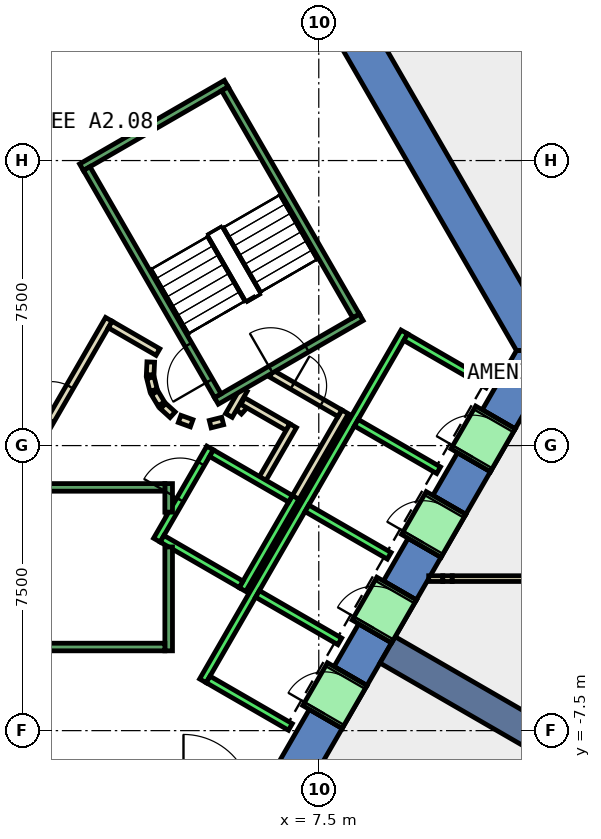
"""IFC4 building model, lengths in metres.
Left out: names, types, materials, properties, quantities, classifications, styles, units other than length and angle.
Written with IfcOpenShell. Run it as: python <this file> out.ifc"""

import sys

from ifc_helpers import new_model, si_unit, direction, frame, frame_2d, origin, place, context, subcontext, project, spatial, polyline, rectangle, outline, extrude, element, fill, save


model = new_model("IFC4")
c1 = context("Model", 3, precision=1e-05, world=origin(), true_north=direction((0.0, 1.0)))
c2 = subcontext(c1, "Body", "Model", "MODEL_VIEW")
j1 = project(units=[si_unit("LENGTHUNIT", "METRE"), si_unit("PLANEANGLEUNIT", "RADIAN")], contexts=[c1])
p1 = place(None, origin())
s1 = spatial("IfcSite", under=j1, at=p1, CompositionType="ELEMENT")
p2 = place(p1, origin())
s2 = spatial("IfcBuilding", under=s1, at=p2, CompositionType="ELEMENT")
p3 = place(p2, frame((0.0, 0.0, 25.0)))
s3 = spatial("IfcBuildingStorey", under=s2, at=p3, CompositionType="ELEMENT", Elevation=25.0)
p4 = place(p3, frame((0.0, 0.0, -0.45)))
e1 = element("IfcWall", 1, at=p4, inside=s3, PredefinedType="SHEAR", context=c2, shape_type="SweptSolid", body=[
    extrude(outline(polyline([(8.517, 11.748), (7.651, 11.248), (12.702, 2.5), (13.856, 2.5), (8.517, 11.748)])), origin(), (0.0, 0.0, 1.0), 5.0),
])
p5 = place(p3, frame((0.0, 0.0, -0.45)))
e2 = element("IfcWall", 2, at=p5, inside=s3, PredefinedType="SHEAR", context=c2, shape_type="SweptSolid", body=[
    extrude(outline(polyline([(8.117, -7.44), (7.252, -6.94), (6.351, -8.5), (6.928, -9.5), (8.117, -7.44)])), origin(), (0.0, 0.0, 1.0), 5.0),
])
p6 = place(p3, frame((0.0, 0.0, -0.45)))
e3 = element("IfcWall", 3, at=p6, inside=s3, PredefinedType="SHEAR", context=c2, shape_type="SweptSolid", body=[
    extrude(outline(polyline([(9.417, -5.189), (8.551, -4.689), (7.902, -5.814), (8.767, -6.314), (9.417, -5.189)])), origin(), (0.0, 0.0, 1.0), 5.0),
])
p7 = place(p3, frame((0.0, 0.0, -0.45)))
e4 = element("IfcWall", 4, at=p7, inside=s3, PredefinedType="SHEAR", context=c2, shape_type="SweptSolid", body=[
    extrude(outline(polyline([(10.717, -2.937), (9.851, -2.437), (9.201, -3.563), (10.067, -4.063), (10.717, -2.937)])), origin(), (0.0, 0.0, 1.0), 5.0),
])
p8 = place(p3, frame((0.0, 0.0, -0.45)))
e5 = element("IfcWall", 5, at=p8, inside=s3, PredefinedType="SHEAR", context=c2, shape_type="SweptSolid", body=[
    extrude(outline(polyline([(12.017, -0.686), (11.151, -0.186), (10.501, -1.311), (11.367, -1.811), (12.017, -0.686)])), origin(), (0.0, 0.0, 1.0), 5.0),
])
p9 = place(p3, frame((0.0, 0.0, -0.45)))
e6 = element("IfcWall", 6, at=p9, inside=s3, PredefinedType="SHEAR", context=c2, shape_type="SweptSolid", body=[
    extrude(outline(polyline([(11.801, 0.94), (12.667, 0.44), (13.856, 2.5), (12.702, 2.5), (11.801, 0.94)])), origin(), (0.0, 0.0, 1.0), 5.0),
])
p10 = place(p3, frame((0.0, 0.0, 3.6)))
e7 = element("IfcWall", 7, at=p10, inside=s3, PredefinedType="SHEAR", context=c2, shape_type="SweptSolid", body=[
    extrude(outline(polyline([(8.767, -6.314), (7.902, -5.814), (7.252, -6.94), (8.117, -7.44), (8.767, -6.314)])), origin(), (0.0, 0.0, 1.0), 0.95),
])
p11 = place(p3, frame((0.0, 0.0, 3.6)))
e8 = element("IfcWall", 8, at=p11, inside=s3, PredefinedType="SHEAR", context=c2, shape_type="SweptSolid", body=[
    extrude(outline(polyline([(10.067, -4.063), (9.201, -3.563), (8.551, -4.689), (9.417, -5.189), (10.067, -4.063)])), origin(), (0.0, 0.0, 1.0), 0.95),
])
p12 = place(p3, frame((0.0, 0.0, 3.6)))
e9 = element("IfcWall", 9, at=p12, inside=s3, PredefinedType="SHEAR", context=c2, shape_type="SweptSolid", body=[
    extrude(outline(polyline([(11.367, -1.811), (10.501, -1.311), (9.851, -2.437), (10.717, -2.937), (11.367, -1.811)])), origin(), (0.0, 0.0, 1.0), 0.95),
])
p13 = place(p3, frame((0.0, 0.0, 3.6)))
e10 = element("IfcWall", 10, at=p13, inside=s3, PredefinedType="SHEAR", context=c2, shape_type="SweptSolid", body=[
    extrude(outline(polyline([(12.667, 0.44), (11.801, 0.94), (11.151, -0.186), (12.017, -0.686), (12.667, 0.44)])), origin(), (0.0, 0.0, 1.0), 0.95),
])
p14 = place(p3, frame((9.31, -5.375, -0.45), z_axis=(0.0, 0.0, 1.0), x_axis=(0.866017533419, -0.500013631625, 0.0)))
e11 = element("IfcWall", 11, at=p14, inside=s3, PredefinedType="SHEAR", context=c2, shape_type="SweptSolid", body=[
    extrude(rectangle(XDim=9.0, YDim=0.8, at=frame_2d((4.5, 0.0))), origin(), (0.0, 0.0, 1.0), 5.0),
])
p15 = place(p3, frame((5.39, 0.898, 0.0), z_axis=(0.0, 0.0, 1.0), x_axis=(0.673828488714, 0.738887791073, 0.0)))
e12 = element("IfcWall", 12, at=p15, inside=s3, PredefinedType="PARTITIONING", context=c2, shape_type="SweptSolid", body=[
    extrude(rectangle(XDim=0.263, YDim=0.2, at=frame_2d((0.131, 0.0))), origin(), (0.0, 0.0, 1.0), 4.55),
])
p16 = place(p3, frame((5.499, 1.172, 0.0), z_axis=(0.0, 0.0, 1.0), x_axis=(0.866333505267, -0.499465972466, 0.0)))
e13 = element("IfcWall", 13, at=p16, inside=s3, PredefinedType="PARTITIONING", context=c2, shape_type="SweptSolid", body=[
    extrude(rectangle(XDim=1.374, YDim=0.2, at=frame_2d((0.687, 0.0))), origin(), (0.0, 0.0, 1.0), 4.55),
])
p17 = place(p3, frame((6.826, 0.522, 0.0), z_axis=(0.0, 0.0, 1.0), x_axis=(-0.500016722714, -0.866015748706, 0.0)))
e14 = element("IfcWall", 14, at=p17, inside=s3, PredefinedType="PARTITIONING", context=c2, shape_type="SweptSolid", body=[
    extrude(rectangle(XDim=1.7, YDim=0.2, at=frame_2d((0.85, 0.0))), origin(), (0.0, 0.0, 1.0), 4.55),
])
p18 = place(p3, frame((8.192, 0.888, 0.0), z_axis=(0.0, 0.0, 1.0), x_axis=(-0.499940625693, -0.866059680843, 0.0)))
e15 = element("IfcWall", 15, at=p18, inside=s3, PredefinedType="PARTITIONING", context=c2, shape_type="SweptSolid", body=[
    extrude(rectangle(XDim=2.68, YDim=0.2, at=frame_2d((1.34, 0.0))), origin(), (0.0, 0.0, 1.0), 4.55),
])
p19 = place(p3, frame((5.135, 0.793, 0.0), z_axis=(0.0, 0.0, 1.0), x_axis=(0.499526442893, 0.866298639529, 0.0)))
e16 = element("IfcWall", 16, at=p19, inside=s3, PredefinedType="PARTITIONING", context=c2, shape_type="SweptSolid", body=[
    extrude(rectangle(XDim=0.791, YDim=0.2, at=frame_2d((0.396, 0.0))), origin(), (0.0, 0.0, 1.0), 4.55),
])
p20 = place(p3, frame((6.25, 1.894, 0.0), z_axis=(0.0, 0.0, 1.0), x_axis=(0.866043184279, -0.499969202016, 0.0)))
e17 = element("IfcWall", 17, at=p20, inside=s3, PredefinedType="PARTITIONING", context=c2, shape_type="SweptSolid", body=[
    extrude(rectangle(XDim=2.084, YDim=0.2, at=frame_2d((1.042, 0.0))), origin(), (0.0, 0.0, 1.0), 4.55),
])
p21 = place(p20, frame((0.642, 0.0, 0.0)))
e18 = element("IfcOpeningElement", 18, at=p21, cuts=e17, PredefinedType="OPENING", context=c2, shape_type="SweptSolid", body=[
    extrude(rectangle(XDim=0.9, YDim=2.1, at=frame_2d((0.45, 1.05))), frame((0.0, 0.11, 0.0), z_axis=(0.0, -1.0, 0.0), x_axis=(1.0, 0.0, 0.0)), (0.0, 0.0, 1.0), 0.22),
])
p22 = place(p3, frame((3.079, 2.199, 0.0), z_axis=(0.0, 0.0, 1.0), x_axis=(-0.047771483479, -0.998858290933, 0.0)))
e19 = element("IfcWall", 19, at=p22, inside=s3, PredefinedType="PARTITIONING", context=c2, shape_type="SweptSolid", body=[
    extrude(rectangle(XDim=0.337, YDim=0.2, at=frame_2d((0.169, 0.0))), origin(), (0.0, 0.0, 1.0), 4.55),
])
p23 = place(p3, frame((3.07, 1.786, 0.0), z_axis=(0.0, 0.0, 1.0), x_axis=(0.242705583207, -0.970099994784, 0.0)))
e20 = element("IfcWall", 20, at=p23, inside=s3, PredefinedType="PARTITIONING", context=c2, shape_type="SweptSolid", body=[
    extrude(rectangle(XDim=0.338, YDim=0.2, at=frame_2d((0.169, 0.0))), origin(), (0.0, 0.0, 1.0), 4.55),
])
for number, where, z_axis, x_axis in (
    (21, (3.182, 1.388, 0.0), (0.0, 0.0, 1.0), (0.512, -0.859, 0.0)),
    (22, (3.404, 1.039, 0.0), (0.0, 0.0, 1.0), (0.74, -0.672, 0.0)),
):
    element("IfcWall", number, at=place(p3, frame(where, z_axis=z_axis, x_axis=x_axis)), inside=s3, PredefinedType="PARTITIONING", context=c2, shape_type="SweptSolid", body=[
        extrude(rectangle(XDim=0.338, YDim=0.2, at=frame_2d((0.169, 0.0))), origin(), (0.0, 0.0, 1.0), 4.55),
    ])
p24 = place(p3, frame((3.838, 0.702, 0.0), z_axis=(0.0, 0.0, 1.0), x_axis=(0.941035081519, -0.338308993895, 0.0)))
e23 = element("IfcWall", 23, at=p24, inside=s3, PredefinedType="PARTITIONING", context=c2, shape_type="SweptSolid", body=[
    extrude(rectangle(XDim=0.337, YDim=0.2, at=frame_2d((0.168, 0.0))), origin(), (0.0, 0.0, 1.0), 4.55),
])
p25 = place(p3, frame((4.644, 0.564, 0.0), z_axis=(0.0, 0.0, 1.0), x_axis=(0.969929076366, 0.243387729394, 0.0)))
e24 = element("IfcWall", 24, at=p25, inside=s3, PredefinedType="PARTITIONING", context=c2, shape_type="SweptSolid", body=[
    extrude(rectangle(XDim=0.337, YDim=0.2, at=frame_2d((0.168, 0.0))), origin(), (0.0, 0.0, 1.0), 4.55),
])
p26 = place(p3, frame((-0.52, -1.0, 0.0), z_axis=(0.0, 0.0, 1.0), x_axis=(0.50011622646, 0.865958290007, 0.0)))
e25 = element("IfcWall", 25, at=p26, inside=s3, PredefinedType="PARTITIONING", context=c2, shape_type="SweptSolid", body=[
    extrude(rectangle(XDim=4.991, YDim=0.2, at=frame_2d((2.496, 0.0))), origin(), (0.0, 0.0, 1.0), 4.55),
])
p27 = place(p26, frame((1.945, 0.0, 0.0)))
e26 = element("IfcOpeningElement", 26, at=p27, cuts=e25, PredefinedType="OPENING", context=c2, shape_type="SweptSolid", body=[
    extrude(rectangle(XDim=1.0, YDim=2.1, at=frame_2d((0.5, 1.05))), frame((0.0, 0.11, 0.0), z_axis=(0.0, -1.0, 0.0), x_axis=(1.0, 0.0, 0.0)), (0.0, 0.0, 1.0), 0.22),
])
p28 = place(p3, frame((2.012, 3.186, 0.0), z_axis=(0.0, 0.0, 1.0), x_axis=(0.865891012941, -0.500232699559, 0.0)))
e27 = element("IfcWall", 27, at=p28, inside=s3, PredefinedType="PARTITIONING", context=c2, shape_type="SweptSolid", body=[
    extrude(rectangle(XDim=1.449, YDim=0.2, at=frame_2d((0.725, 0.0))), origin(), (0.0, 0.0, 1.0), 4.55),
])
p29 = place(p3, frame((10.392, -3.5, 0.0), z_axis=(0.0, 0.0, 1.0), x_axis=(1.0, 0.0, 0.0)))
e28 = element("IfcWall", 28, at=p29, inside=s3, PredefinedType="PARTITIONING", context=c2, shape_type="SweptSolid", body=[
    extrude(rectangle(XDim=0.371, YDim=0.15, at=frame_2d((0.186, 0.0))), origin(), (0.0, 0.0, 1.0), 4.55),
])
p30 = place(p3, frame((10.763, -3.5, 0.0), z_axis=(0.0, 0.0, 1.0), x_axis=(1.0, 0.0, 0.0)))
e29 = element("IfcWall", 29, at=p30, inside=s3, PredefinedType="PARTITIONING", context=c2, shape_type="SweptSolid", body=[
    extrude(rectangle(XDim=0.249, YDim=0.15, at=frame_2d((0.125, 0.0))), origin(), (0.0, 0.0, 1.0), 2.4),
])
p31 = place(p3, frame((11.012, -3.5, 0.0), z_axis=(0.0, 0.0, 1.0), x_axis=(1.0, 0.0, 0.0)))
e30 = element("IfcWall", 30, at=p31, inside=s3, PredefinedType="PARTITIONING", context=c2, shape_type="SweptSolid", body=[
    extrude(rectangle(XDim=12.765, YDim=0.15, at=frame_2d((6.383, 0.0))), origin(), (0.0, 0.0, 1.0), 4.55),
])
p32 = place(p31, frame((5.21, 0.0, 0.0)))
e31 = element("IfcOpeningElement", 31, at=p32, cuts=e30, PredefinedType="OPENING", context=c2, shape_type="SweptSolid", body=[
    extrude(rectangle(XDim=1.8, YDim=2.1, at=frame_2d((0.9, 1.05))), frame((0.0, 0.085, 0.0), z_axis=(0.0, -1.0, 0.0), x_axis=(1.0, 0.0, 0.0)), (0.0, 0.0, 1.0), 0.17),
])
p33 = place(p3, frame((3.24, -2.488, 0.0), z_axis=(0.0, 0.0, 1.0), x_axis=(0.49994636267, 0.866056369097, 0.0)))
e32 = element("IfcWall", 32, at=p33, inside=s3, PredefinedType="STANDARD", context=c2, shape_type="SweptSolid", body=[
    extrude(rectangle(XDim=2.8, YDim=0.2, at=frame_2d((1.4, 0.0))), origin(), (0.0, 0.0, 1.0), 4.55),
])
p34 = place(p33, frame((1.225, 0.0, 0.0)))
e33 = element("IfcOpeningElement", 33, at=p34, cuts=e32, PredefinedType="OPENING", context=c2, shape_type="SweptSolid", body=[
    extrude(rectangle(XDim=1.1, YDim=2.1, at=frame_2d((0.55, 1.05))), frame((0.0, 0.11, 0.0), z_axis=(0.0, -1.0, 0.0), x_axis=(1.0, 0.0, 0.0)), (0.0, 0.0, 1.0), 0.22),
])
p35 = place(p3, frame((5.492, -3.788, 0.0), z_axis=(0.0, 0.0, 1.0), x_axis=(0.500011755427, 0.866018616679, 0.0)))
e34 = element("IfcWall", 34, at=p35, inside=s3, PredefinedType="STANDARD", context=c2, shape_type="SweptSolid", body=[
    extrude(rectangle(XDim=2.8, YDim=0.2, at=frame_2d((1.4, 0.0))), origin(), (0.0, 0.0, 1.0), 4.55),
])
p36 = place(p3, frame((3.377, -2.452, 0.0), z_axis=(0.0, 0.0, 1.0), x_axis=(0.865955154139, -0.50012165622, 0.0)))
e35 = element("IfcWall", 35, at=p36, inside=s3, PredefinedType="STANDARD", context=c2, shape_type="SweptSolid", body=[
    extrude(rectangle(XDim=2.4, YDim=0.2, at=frame_2d((1.2, 0.0))), origin(), (0.0, 0.0, 1.0), 4.55),
])
p37 = place(p3, frame((4.677, -0.2, 0.0), z_axis=(0.0, 0.0, 1.0), x_axis=(0.865973769406, -0.500089422704, 0.0)))
e36 = element("IfcWall", 36, at=p37, inside=s3, PredefinedType="STANDARD", context=c2, shape_type="SweptSolid", body=[
    extrude(rectangle(XDim=2.399, YDim=0.2, at=frame_2d((1.2, 0.0))), origin(), (0.0, 0.0, 1.0), 4.55),
])
p38 = place(p3, frame((4.451, -6.19, 0.0), z_axis=(0.0, 0.0, 1.0), x_axis=(0.50000090737, 0.866024879913, 0.0)))
e37 = element("IfcWall", 37, at=p38, inside=s3, PredefinedType="STANDARD", context=c2, shape_type="SweptSolid", body=[
    extrude(rectangle(XDim=10.6, YDim=0.2, at=frame_2d((5.3, 0.0))), origin(), (0.0, 0.0, 1.0), 4.55),
])
for number, where, z_axis, x_axis in (
    (38, (4.588, -6.153, 0.0), (0.0, 0.0, 1.0), (0.866, -0.5, 0.0)),
    (39, (5.888, -3.902, 0.0), (0.0, 0.0, 1.0), (0.866, -0.5, 0.0)),
    (40, (7.188, -1.65, 0.0), (0.0, 0.0, 1.0), (0.866, -0.5, 0.0)),
    (41, (8.488, 0.602, 0.0), (0.0, 0.0, 1.0), (0.866, -0.5, 0.0)),
):
    element("IfcWall", number, at=place(p3, frame(where, z_axis=z_axis, x_axis=x_axis)), inside=s3, PredefinedType="STANDARD", context=c2, shape_type="SweptSolid", body=[
        extrude(rectangle(XDim=2.5, YDim=0.2, at=frame_2d((1.25, 0.0))), origin(), (0.0, 0.0, 1.0), 4.55),
    ])
p39 = place(p3, frame((9.788, 2.853, 0.0), z_axis=(0.0, 0.0, 1.0), x_axis=(0.865998541277, -0.500046524342, 0.0)))
e42 = element("IfcWall", 42, at=p39, inside=s3, PredefinedType="STANDARD", context=c2, shape_type="SweptSolid", body=[
    extrude(rectangle(XDim=2.5, YDim=0.2, at=frame_2d((1.25, 0.0))), origin(), (0.0, 0.0, 1.0), 4.55),
])
p40 = place(p3, frame((7.598, -7.14, 0.0), z_axis=(0.0, 0.0, 1.0), x_axis=(0.500362116554, 0.865816234728, 0.0)))
e43 = element("IfcWall", 43, at=p40, inside=s3, PredefinedType="STANDARD", context=c2, shape_type="SweptSolid", body=[
    extrude(rectangle(XDim=1.299, YDim=1.2, at=frame_2d((0.65, 0.0))), origin(), (0.0, 0.0, 1.0), 2.4),
])
p41 = place(p40, frame((0.1, 0.0, 0.0)))
e44 = element("IfcOpeningElement", 44, at=p41, cuts=e43, PredefinedType="OPENING", context=c2, shape_type="SweptSolid", body=[
    extrude(rectangle(XDim=1.1, YDim=2.3, at=frame_2d((0.55, 1.15))), frame((0.0, 0.61, 0.0), z_axis=(0.0, -1.0, 0.0), x_axis=(1.0, 0.0, 0.0)), (0.0, 0.0, 1.0), 1.22),
])
p42 = place(p3, frame((8.898, -4.889, 0.0), z_axis=(0.0, 0.0, 1.0), x_axis=(0.500036693733, 0.866004217611, 0.0)))
e45 = element("IfcWall", 45, at=p42, inside=s3, PredefinedType="STANDARD", context=c2, shape_type="SweptSolid", body=[
    extrude(rectangle(XDim=1.3, YDim=1.2, at=frame_2d((0.65, 0.0))), origin(), (0.0, 0.0, 1.0), 2.4),
])
p43 = place(p42, frame((0.1, 0.0, 0.0)))
e46 = element("IfcOpeningElement", 46, at=p43, cuts=e45, PredefinedType="OPENING", context=c2, shape_type="SweptSolid", body=[
    extrude(rectangle(XDim=1.1, YDim=2.3, at=frame_2d((0.55, 1.15))), frame((0.0, 0.61, 0.0), z_axis=(0.0, -1.0, 0.0), x_axis=(1.0, 0.0, 0.0)), (0.0, 0.0, 1.0), 1.22),
])
p44 = place(p3, frame((10.198, -2.637, 0.0), z_axis=(0.0, 0.0, 1.0), x_axis=(0.49989585183, 0.866085525409, 0.0)))
e47 = element("IfcWall", 47, at=p44, inside=s3, PredefinedType="STANDARD", context=c2, shape_type="SweptSolid", body=[
    extrude(rectangle(XDim=1.3, YDim=1.2, at=frame_2d((0.65, 0.0))), origin(), (0.0, 0.0, 1.0), 2.4),
])
p45 = place(p44, frame((0.1, 0.0, 0.0)))
e48 = element("IfcOpeningElement", 48, at=p45, cuts=e47, PredefinedType="OPENING", context=c2, shape_type="SweptSolid", body=[
    extrude(rectangle(XDim=1.1, YDim=2.3, at=frame_2d((0.55, 1.15))), frame((0.0, 0.61, 0.0), z_axis=(0.0, -1.0, 0.0), x_axis=(1.0, 0.0, 0.0)), (0.0, 0.0, 1.0), 1.22),
])
p46 = place(p3, frame((11.498, -0.385, 0.0), z_axis=(0.0, 0.0, 1.0), x_axis=(0.500221244143, 0.865897630733, 0.0)))
e49 = element("IfcWall", 49, at=p46, inside=s3, PredefinedType="STANDARD", context=c2, shape_type="SweptSolid", body=[
    extrude(rectangle(XDim=1.299, YDim=1.2, at=frame_2d((0.65, 0.0))), origin(), (0.0, 0.0, 1.0), 2.4),
])
p47 = place(p46, frame((0.1, 0.0, 0.0)))
e50 = element("IfcOpeningElement", 50, at=p47, cuts=e49, PredefinedType="OPENING", context=c2, shape_type="SweptSolid", body=[
    extrude(rectangle(XDim=1.1, YDim=2.3, at=frame_2d((0.55, 1.15))), frame((0.0, 0.61, 0.0), z_axis=(0.0, -1.0, 0.0), x_axis=(1.0, 0.0, 0.0)), (0.0, 0.0, 1.0), 1.22),
])
p48 = place(p3, frame((3.55, -2.667, 0.0), z_axis=(0.0, 0.0, 1.0), x_axis=(0.0, -1.0, 0.0)))
e51 = element("IfcWall", 51, at=p48, inside=s3, PredefinedType="STANDARD", context=c2, shape_type="SweptSolid", body=[
    extrude(rectangle(XDim=2.733, YDim=0.2, at=frame_2d((1.366, 0.0))), origin(), (0.0, 0.0, 1.0), 4.55),
])
p49 = place(p3, frame((3.55, -1.0, 0.0), z_axis=(0.0, 0.0, 1.0), x_axis=(0.0, -1.0, 0.0)))
e52 = element("IfcWall", 52, at=p49, inside=s3, PredefinedType="STANDARD", context=c2, shape_type="SweptSolid", body=[
    extrude(rectangle(XDim=0.751, YDim=0.2, at=frame_2d((0.375, 0.0))), origin(), (0.0, 0.0, 1.0), 4.55),
])
p50 = place(p3, frame((-3.45, -1.1, 0.0), z_axis=(0.0, 0.0, 1.0), x_axis=(1.0, 0.0, 0.0)))
e53 = element("IfcWall", 53, at=p50, inside=s3, PredefinedType="STANDARD", context=c2, shape_type="SweptSolid", body=[
    extrude(rectangle(XDim=6.9, YDim=0.2, at=frame_2d((3.45, 0.0))), origin(), (0.0, 0.0, 1.0), 4.55),
])
p51 = place(p50, frame((0.45, 0.0, 0.0)))
e54 = element("IfcOpeningElement", 54, at=p51, cuts=e53, PredefinedType="OPENING", context=c2, shape_type="SweptSolid", body=[
    extrude(rectangle(XDim=1.1, YDim=2.2, at=frame_2d((0.55, 1.1))), frame((0.0, 0.11, 0.0), z_axis=(0.0, -1.0, 0.0), x_axis=(1.0, 0.0, 0.0)), (0.0, 0.0, 1.0), 0.22),
])
p52 = place(p3, frame((-3.45, -5.3, 0.0), z_axis=(0.0, 0.0, 1.0), x_axis=(1.0, 0.0, 0.0)))
e55 = element("IfcWall", 55, at=p52, inside=s3, PredefinedType="STANDARD", context=c2, shape_type="SweptSolid", body=[
    extrude(rectangle(XDim=6.9, YDim=0.2, at=frame_2d((3.45, 0.0))), origin(), (0.0, 0.0, 1.0), 4.55),
])
p53 = place(p3, frame((4.806, 1.176, 0.0), z_axis=(0.0, 0.0, 1.0), x_axis=(0.866059941101, 0.499940174841, 0.0)))
e56 = element("IfcWall", 56, at=p53, inside=s3, PredefinedType="STANDARD", context=c2, shape_type="SweptSolid", body=[
    extrude(rectangle(XDim=4.4, YDim=0.2, at=frame_2d((2.2, 0.0))), origin(), (0.0, 0.0, 1.0), 4.55),
])
p54 = place(p53, frame((1.65, 0.0, 0.0)))
e57 = element("IfcOpeningElement", 57, at=p54, cuts=e56, PredefinedType="OPENING", context=c2, shape_type="SweptSolid", body=[
    extrude(rectangle(XDim=1.1, YDim=2.2, at=frame_2d((0.55, 1.1))), frame((0.0, 0.11, 0.0), z_axis=(0.0, -1.0, 0.0), x_axis=(1.0, 0.0, 0.0)), (0.0, 0.0, 1.0), 0.22),
])
p55 = place(p3, frame((1.256, 7.324, 0.0), z_axis=(0.0, 0.0, 1.0), x_axis=(0.866046073146, 0.499964197906, 0.0)))
e58 = element("IfcWall", 58, at=p55, inside=s3, PredefinedType="STANDARD", context=c2, shape_type="SweptSolid", body=[
    extrude(rectangle(XDim=4.4, YDim=0.2, at=frame_2d((2.2, 0.0))), origin(), (0.0, 0.0, 1.0), 4.55),
])
p56 = place(p3, frame((4.843, 1.312, 0.0), z_axis=(0.0, 0.0, 1.0), x_axis=(-0.499963383562, 0.866046543262, 0.0)))
e59 = element("IfcWall", 59, at=p56, inside=s3, PredefinedType="STANDARD", context=c2, shape_type="SweptSolid", body=[
    extrude(rectangle(XDim=6.9, YDim=0.2, at=frame_2d((3.45, 0.0))), origin(), (0.0, 0.0, 1.0), 4.55),
])
p57 = place(p56, frame((0.45, 0.0, 0.0)))
e60 = element("IfcOpeningElement", 60, at=p57, cuts=e59, PredefinedType="OPENING", context=c2, shape_type="SweptSolid", body=[
    extrude(rectangle(XDim=1.1, YDim=2.2, at=frame_2d((0.55, 1.1))), frame((0.0, 0.11, 0.0), z_axis=(0.0, -1.0, 0.0), x_axis=(1.0, 0.0, 0.0)), (0.0, 0.0, 1.0), 0.22),
])
p58 = place(p3, frame((8.48, 3.412, 0.0), z_axis=(0.0, 0.0, 1.0), x_axis=(-0.499978703459, 0.866037698999, 0.0)))
e61 = element("IfcWall", 61, at=p58, inside=s3, PredefinedType="STANDARD", context=c2, shape_type="SweptSolid", body=[
    extrude(rectangle(XDim=6.9, YDim=0.2, at=frame_2d((3.45, 0.0))), origin(), (0.0, 0.0, 1.0), 4.55),
])
p59 = place(p27, origin())
e62 = element("IfcDoor", 62, at=p59, inside=s3, OperationType="SINGLE_SWING_LEFT", PredefinedType="DOOR", context=c2, shape_type="SweptSolid", body=[
    extrude(rectangle(XDim=1.0, YDim=2.1, at=frame_2d((0.5, 1.05))), frame((0.0, 0.025, 0.0), z_axis=(0.0, -1.0, 0.0), x_axis=(1.0, 0.0, 0.0)), (0.0, 0.0, 1.0), 0.05),
])
fill(e26, e62)
p60 = place(p21, origin())
e63 = element("IfcDoor", 63, at=p60, inside=s3, OperationType="SINGLE_SWING_LEFT", PredefinedType="DOOR", context=c2, shape_type="SweptSolid", body=[
    extrude(rectangle(XDim=0.9, YDim=2.1, at=frame_2d((0.45, 1.05))), frame((0.0, 0.025, 0.0), z_axis=(0.0, -1.0, 0.0), x_axis=(1.0, 0.0, 0.0)), (0.0, 0.0, 1.0), 0.05),
])
fill(e18, e63)
p61 = place(p41, origin())
e64 = element("IfcDoor", 64, at=p61, inside=s3, OperationType="SLIDING_TO_LEFT", PredefinedType="DOOR", context=c2, shape_type="SweptSolid", body=[
    extrude(rectangle(XDim=1.1, YDim=2.3, at=frame_2d((0.55, 1.15))), frame((0.0, 0.025, 0.0), z_axis=(0.0, -1.0, 0.0), x_axis=(1.0, 0.0, 0.0)), (0.0, 0.0, 1.0), 0.05),
])
fill(e44, e64)
p62 = place(p43, origin())
e65 = element("IfcDoor", 65, at=p62, inside=s3, OperationType="SLIDING_TO_LEFT", PredefinedType="DOOR", context=c2, shape_type="SweptSolid", body=[
    extrude(rectangle(XDim=1.1, YDim=2.3, at=frame_2d((0.55, 1.15))), frame((0.0, 0.025, 0.0), z_axis=(0.0, -1.0, 0.0), x_axis=(1.0, 0.0, 0.0)), (0.0, 0.0, 1.0), 0.05),
])
fill(e46, e65)
p63 = place(p45, origin())
e66 = element("IfcDoor", 66, at=p63, inside=s3, OperationType="SLIDING_TO_LEFT", PredefinedType="DOOR", context=c2, shape_type="SweptSolid", body=[
    extrude(rectangle(XDim=1.1, YDim=2.3, at=frame_2d((0.55, 1.15))), frame((0.0, 0.025, 0.0), z_axis=(0.0, -1.0, 0.0), x_axis=(1.0, 0.0, 0.0)), (0.0, 0.0, 1.0), 0.05),
])
fill(e48, e66)
p64 = place(p47, origin())
e67 = element("IfcDoor", 67, at=p64, inside=s3, OperationType="SLIDING_TO_LEFT", PredefinedType="DOOR", context=c2, shape_type="SweptSolid", body=[
    extrude(rectangle(XDim=1.1, YDim=2.3, at=frame_2d((0.55, 1.15))), frame((0.0, 0.025, 0.0), z_axis=(0.0, -1.0, 0.0), x_axis=(1.0, 0.0, 0.0)), (0.0, 0.0, 1.0), 0.05),
])
fill(e50, e67)
p65 = place(p34, origin())
e68 = element("IfcDoor", 68, at=p65, inside=s3, OperationType="SLIDING_TO_LEFT", PredefinedType="DOOR", context=c2, shape_type="SweptSolid", body=[
    extrude(rectangle(XDim=1.1, YDim=2.1, at=frame_2d((0.55, 1.05))), frame((0.0, 0.025, 0.0), z_axis=(0.0, -1.0, 0.0), x_axis=(1.0, 0.0, 0.0)), (0.0, 0.0, 1.0), 0.05),
])
fill(e33, e68)
p66 = place(p57, origin())
e69 = element("IfcDoor", 69, at=p66, inside=s3, OperationType="SINGLE_SWING_LEFT", PredefinedType="DOOR", context=c2, shape_type="SweptSolid", body=[
    extrude(rectangle(XDim=1.1, YDim=2.2, at=frame_2d((0.55, 1.1))), frame((0.0, 0.025, 0.0), z_axis=(0.0, -1.0, 0.0), x_axis=(1.0, 0.0, 0.0)), (0.0, 0.0, 1.0), 0.05),
])
fill(e60, e69)
p67 = place(p54, origin())
e70 = element("IfcDoor", 70, at=p67, inside=s3, OperationType="SINGLE_SWING_LEFT", PredefinedType="DOOR", context=c2, shape_type="SweptSolid", body=[
    extrude(rectangle(XDim=1.1, YDim=2.2, at=frame_2d((0.55, 1.1))), frame((0.0, 0.025, 0.0), z_axis=(0.0, -1.0, 0.0), x_axis=(1.0, 0.0, 0.0)), (0.0, 0.0, 1.0), 0.05),
])
fill(e57, e70)
save(model, sys.argv[1])
